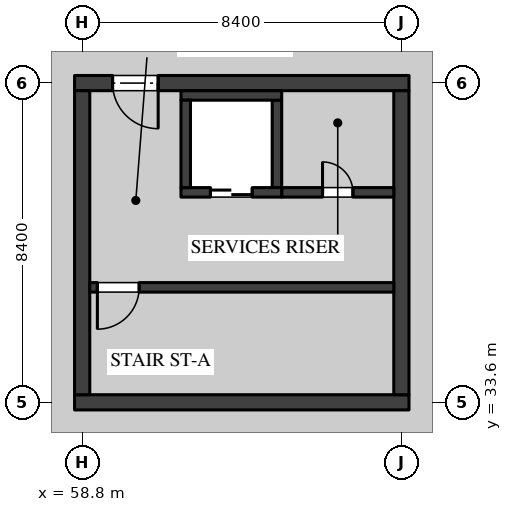
"""IFC4 building model, lengths in metres.
Left out: names, types, materials, properties, quantities, classifications, styles, units other than length and angle.
Written with IfcOpenShell. Run it as: python <this file> out.ifc"""

import sys

from ifc_helpers import new_model, si_unit, direction, frame, frame_2d, origin, place, context, subcontext, project, spatial, rectangle, extrude, element, fill, save


model = new_model("IFC4")
c1 = context("Model", 3, precision=1e-05, world=origin(), true_north=direction((0.0, 1.0)))
c2 = subcontext(c1, "Body", "Model", "MODEL_VIEW")
j1 = project(units=[si_unit("LENGTHUNIT", "METRE"), si_unit("PLANEANGLEUNIT", "RADIAN")], contexts=[c1])
p1 = place(None, origin())
s1 = spatial("IfcSite", under=j1, at=p1, CompositionType="ELEMENT")
p2 = place(p1, origin())
s2 = spatial("IfcBuilding", under=s1, at=p2, CompositionType="ELEMENT")
p3 = place(p2, frame((0.0, 0.0, -4.5)))
s3 = spatial("IfcBuildingStorey", under=s2, at=p3, CompositionType="ELEMENT", Elevation=-4.5)
p4 = place(p3, frame((58.6, 33.6, 0.0), z_axis=(0.0, 0.0, 1.0), x_axis=(1.0, 0.0, 0.0)))
e1 = element("IfcWall", 1, at=p4, inside=s3, PredefinedType="SHEAR", context=c2, shape_type="SweptSolid", body=[
    extrude(rectangle(XDim=8.8, YDim=0.4, at=frame_2d((4.4, 0.0))), origin(), (0.0, 0.0, 1.0), 4.05),
])
p5 = place(p3, frame((58.6, 42.0, 0.0), z_axis=(0.0, 0.0, 1.0), x_axis=(1.0, 0.0, 0.0)))
e2 = element("IfcWall", 2, at=p5, inside=s3, PredefinedType="SHEAR", context=c2, shape_type="SweptSolid", body=[
    extrude(rectangle(XDim=8.8, YDim=0.4, at=frame_2d((4.4, 0.0))), origin(), (0.0, 0.0, 1.0), 4.05),
])
p6 = place(p5, frame((1.0, 0.0, 0.0)))
e3 = element("IfcOpeningElement", 3, at=p6, cuts=e2, PredefinedType="OPENING", context=c2, shape_type="SweptSolid", body=[
    extrude(rectangle(XDim=1.2, YDim=2.1, at=frame_2d((0.6, 1.05))), frame((0.0, 0.21, 0.0), z_axis=(0.0, -1.0, 0.0), x_axis=(1.0, 0.0, 0.0)), (0.0, 0.0, 1.0), 0.42),
])
for number, where, z_axis, x_axis in (
    (4, (58.8, 33.8, 0.0), (0.0, 0.0, 1.0), (0.0, 1.0, 0.0)),
    (5, (67.2, 33.8, 0.0), (0.0, 0.0, 1.0), (0.0, 1.0, 0.0)),
):
    element("IfcWall", number, at=place(p3, frame(where, z_axis=z_axis, x_axis=x_axis)), inside=s3, PredefinedType="SHEAR", context=c2, shape_type="SweptSolid", body=[
        extrude(rectangle(XDim=8.0, YDim=0.4, at=frame_2d((4.0, 0.0))), origin(), (0.0, 0.0, 1.0), 4.05),
    ])
p7 = place(p3, frame((59.0, 36.625, 0.0), z_axis=(0.0, 0.0, 1.0), x_axis=(1.0, 0.0, 0.0)))
e6 = element("IfcWall", 6, at=p7, inside=s3, PredefinedType="SOLIDWALL", context=c2, shape_type="SweptSolid", body=[
    extrude(rectangle(XDim=8.0, YDim=0.25, at=frame_2d((4.0, 0.0))), origin(), (0.0, 0.0, 1.0), 4.05),
])
p8 = place(p7, frame((0.2, 0.0, 0.0)))
e7 = element("IfcOpeningElement", 7, at=p8, cuts=e6, PredefinedType="OPENING", context=c2, shape_type="SweptSolid", body=[
    extrude(rectangle(XDim=1.1, YDim=2.1, at=frame_2d((0.55, 1.05))), frame((0.0, 0.135, 0.0), z_axis=(0.0, -1.0, 0.0), x_axis=(1.0, 0.0, 0.0)), (0.0, 0.0, 1.0), 0.27),
])
p9 = place(p3, frame((64.05, 39.125, 0.0), z_axis=(0.0, 0.0, 1.0), x_axis=(1.0, 0.0, 0.0)))
e8 = element("IfcWall", 8, at=p9, inside=s3, PredefinedType="SOLIDWALL", context=c2, shape_type="SweptSolid", body=[
    extrude(rectangle(XDim=2.95, YDim=0.25, at=frame_2d((1.475, 0.0))), origin(), (0.0, 0.0, 1.0), 4.05),
])
p10 = place(p9, frame((1.075, 0.0, 0.0)))
e9 = element("IfcOpeningElement", 9, at=p10, cuts=e8, PredefinedType="OPENING", context=c2, shape_type="SweptSolid", body=[
    extrude(rectangle(XDim=0.8, YDim=2.1, at=frame_2d((0.4, 1.05))), frame((0.0, 0.135, 0.0), z_axis=(0.0, -1.0, 0.0), x_axis=(1.0, 0.0, 0.0)), (0.0, 0.0, 1.0), 0.27),
])
p11 = place(p3, frame((63.925, 39.25, 0.0), z_axis=(0.0, 0.0, 1.0), x_axis=(0.0, 1.0, 0.0)))
e10 = element("IfcWall", 10, at=p11, inside=s3, PredefinedType="SOLIDWALL", context=c2, shape_type="SweptSolid", body=[
    extrude(rectangle(XDim=2.3, YDim=0.25, at=frame_2d((1.15, 0.0))), origin(), (0.0, 0.0, 1.0), 4.05),
])
p12 = place(p3, frame((61.4, 41.675, 0.0), z_axis=(0.0, 0.0, 1.0), x_axis=(1.0, 0.0, 0.0)))
e11 = element("IfcWall", 11, at=p12, inside=s3, PredefinedType="SOLIDWALL", context=c2, shape_type="SweptSolid", body=[
    extrude(rectangle(XDim=2.65, YDim=0.25, at=frame_2d((1.325, 0.0))), origin(), (0.0, 0.0, 1.0), 4.05),
])
p13 = place(p3, frame((61.4, 39.125, 0.0), z_axis=(0.0, 0.0, 1.0), x_axis=(1.0, 0.0, 0.0)))
e12 = element("IfcWall", 12, at=p13, inside=s3, PredefinedType="SOLIDWALL", context=c2, shape_type="SweptSolid", body=[
    extrude(rectangle(XDim=2.65, YDim=0.25, at=frame_2d((1.325, 0.0))), origin(), (0.0, 0.0, 1.0), 4.05),
])
p14 = place(p13, frame((0.775, 0.0, 0.0)))
e13 = element("IfcOpeningElement", 13, at=p14, cuts=e12, PredefinedType="OPENING", context=c2, shape_type="SweptSolid", body=[
    extrude(rectangle(XDim=1.1, YDim=2.1, at=frame_2d((0.55, 1.05))), frame((0.0, 0.135, 0.0), z_axis=(0.0, -1.0, 0.0), x_axis=(1.0, 0.0, 0.0)), (0.0, 0.0, 1.0), 0.27),
])
p15 = place(p3, frame((61.525, 39.25, 0.0), z_axis=(0.0, 0.0, 1.0), x_axis=(0.0, 1.0, 0.0)))
e14 = element("IfcWall", 14, at=p15, inside=s3, PredefinedType="SOLIDWALL", context=c2, shape_type="SweptSolid", body=[
    extrude(rectangle(XDim=2.3, YDim=0.25, at=frame_2d((1.15, 0.0))), origin(), (0.0, 0.0, 1.0), 4.05),
])
p16 = place(p6, frame((1.2, 0.0, 0.0), z_axis=(0.0, 0.0, 1.0), x_axis=(-1.0, 0.0, 0.0)))
e15 = element("IfcDoor", 15, at=p16, inside=s3, OperationType="SINGLE_SWING_RIGHT", PredefinedType="DOOR", context=c2, shape_type="SweptSolid", body=[
    extrude(rectangle(XDim=1.2, YDim=2.1, at=frame_2d((0.6, 1.05))), frame((0.0, 0.035, 0.0), z_axis=(0.0, -1.0, 0.0), x_axis=(1.0, 0.0, 0.0)), (0.0, 0.0, 1.0), 0.07),
])
fill(e3, e15)
p17 = place(p10, origin())
e16 = element("IfcDoor", 16, at=p17, inside=s3, OperationType="SINGLE_SWING_RIGHT", PredefinedType="DOOR", context=c2, shape_type="SweptSolid", body=[
    extrude(rectangle(XDim=0.8, YDim=2.1, at=frame_2d((0.4, 1.05))), frame((0.0, 0.035, 0.0), z_axis=(0.0, -1.0, 0.0), x_axis=(1.0, 0.0, 0.0)), (0.0, 0.0, 1.0), 0.07),
])
fill(e9, e16)
p18 = place(p8, frame((1.1, 0.0, 0.0), z_axis=(0.0, 0.0, 1.0), x_axis=(-1.0, 0.0, 0.0)))
e17 = element("IfcDoor", 17, at=p18, inside=s3, OperationType="SINGLE_SWING_LEFT", PredefinedType="DOOR", context=c2, shape_type="SweptSolid", body=[
    extrude(rectangle(XDim=1.1, YDim=2.1, at=frame_2d((0.55, 1.05))), frame((0.0, 0.035, 0.0), z_axis=(0.0, -1.0, 0.0), x_axis=(1.0, 0.0, 0.0)), (0.0, 0.0, 1.0), 0.07),
])
fill(e7, e17)
p19 = place(p14, origin())
e18 = element("IfcDoor", 18, at=p19, inside=s3, OperationType="DOUBLE_DOOR_SLIDING", PredefinedType="DOOR", context=c2, shape_type="SweptSolid", body=[
    extrude(rectangle(XDim=1.1, YDim=2.1, at=frame_2d((0.55, 1.05))), frame((0.0, 0.04, 0.0), z_axis=(0.0, -1.0, 0.0), x_axis=(1.0, 0.0, 0.0)), (0.0, 0.0, 1.0), 0.08),
])
fill(e13, e18)
save(model, sys.argv[1])
